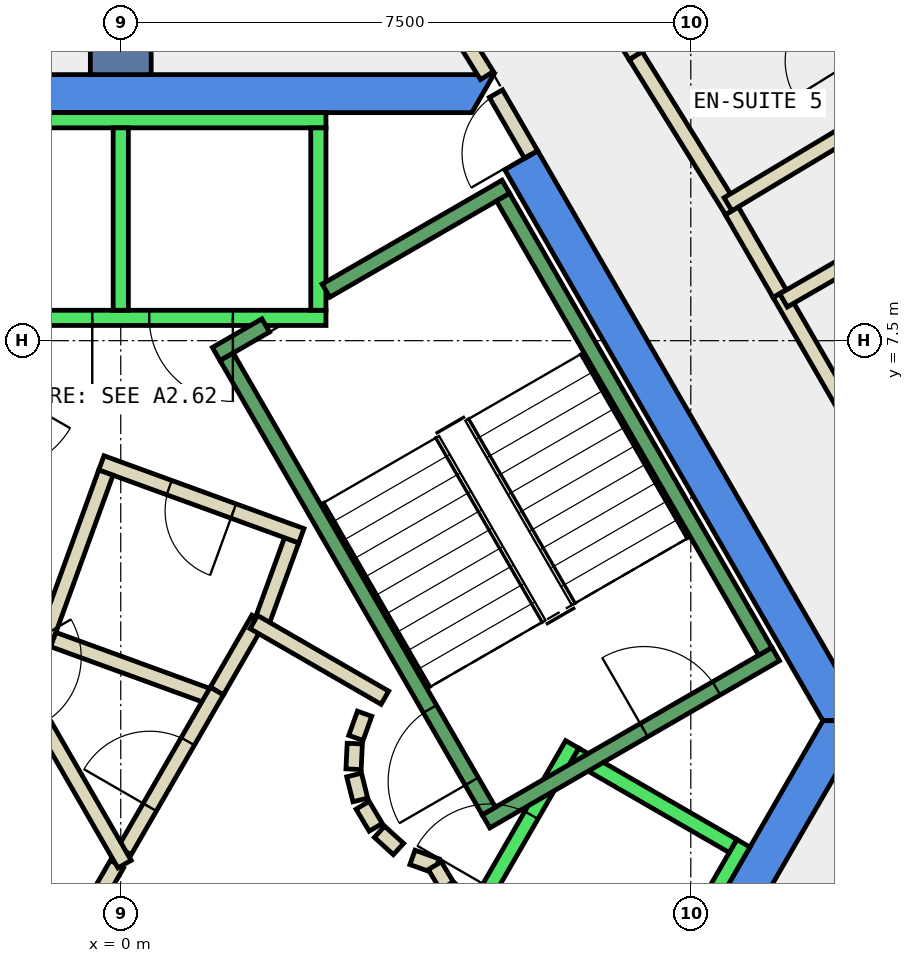
"""IFC4 building model, lengths in metres.
Left out: names, types, materials, properties, quantities, classifications, styles, units other than length and angle.
Written with IfcOpenShell. Run it as: python <this file> out.ifc"""

import sys

from ifc_helpers import new_model, si_unit, direction, frame, frame_2d, origin, place, context, subcontext, project, spatial, polyline, rectangle, outline, extrude, element, fill, save


model = new_model("IFC4")
c1 = context("Model", 3, precision=1e-05, world=origin(), true_north=direction((0.0, 1.0)))
c2 = subcontext(c1, "Body", "Model", "MODEL_VIEW")
j1 = project(units=[si_unit("LENGTHUNIT", "METRE"), si_unit("PLANEANGLEUNIT", "RADIAN")], contexts=[c1])
p1 = place(None, origin())
s1 = spatial("IfcSite", under=j1, at=p1, CompositionType="ELEMENT")
p2 = place(p1, origin())
s2 = spatial("IfcBuilding", under=s1, at=p2, CompositionType="ELEMENT")
p3 = place(p2, frame((0.0, 0.0, 293.6)))
s3 = spatial("IfcBuildingStorey", under=s2, at=p3, CompositionType="ELEMENT", Elevation=293.6)
p4 = place(p3, frame((0.0, 0.0, -0.34)))
e1 = element("IfcWall", 1, at=p4, inside=s3, PredefinedType="SHEAR", context=c2, shape_type="SweptSolid", body=[
    extrude(outline(polyline([(5.486, 9.998), (5.053, 9.748), (9.238, 2.5), (9.815, 2.5), (5.486, 9.998)])), origin(), (0.0, 0.0, 1.0), 3.6),
])
p5 = place(p3, frame((0.0, 0.0, -0.34)))
e2 = element("IfcWall", 2, at=p5, inside=s3, PredefinedType="SHEAR", context=c2, shape_type="SweptSolid", body=[
    extrude(outline(polyline([(4.907, 11.0), (-4.907, 11.0), (-4.619, 10.5), (4.619, 10.5), (4.907, 11.0)])), origin(), (0.0, 0.0, 1.0), 3.6),
])
p6 = place(p3, frame((0.0, 0.0, -0.34)))
e3 = element("IfcWall", 3, at=p6, inside=s3, PredefinedType="SHEAR", context=c2, shape_type="SweptSolid", body=[
    extrude(outline(polyline([(4.907, -6.0), (9.815, 2.5), (9.238, 2.5), (4.619, -5.5), (4.907, -6.0)])), origin(), (0.0, 0.0, 1.0), 3.6),
])
p7 = place(p3, frame((0.0, 11.0, -0.34), z_axis=(0.0, 0.0, 1.0), x_axis=(0.0, 1.0, 0.0)))
e4 = element("IfcWall", 4, at=p7, inside=s3, PredefinedType="SHEAR", context=c2, shape_type="SweptSolid", body=[
    extrude(rectangle(XDim=9.0, YDim=0.8, at=frame_2d((4.5, 0.0))), origin(), (0.0, 0.0, 1.0), 3.6),
])
p8 = place(p3, frame((1.264, 2.89, 0.0), z_axis=(0.0, 0.0, 1.0), x_axis=(0.500043792738, 0.866000118559, 0.0)))
e5 = element("IfcWall", 5, at=p8, inside=s3, PredefinedType="PARTITIONING", context=c2, shape_type="SweptSolid", body=[
    extrude(rectangle(XDim=1.096, YDim=0.2, at=frame_2d((0.548, 0.0))), origin(), (0.0, 0.0, 1.0), 3.26),
])
p9 = place(p3, frame((1.838, 3.748, 0.0), z_axis=(0.0, 0.0, 1.0), x_axis=(0.342266462435, 0.939602931398, 0.0)))
e6 = element("IfcWall", 6, at=p9, inside=s3, PredefinedType="PARTITIONING", context=c2, shape_type="SweptSolid", body=[
    extrude(rectangle(XDim=1.198, YDim=0.2, at=frame_2d((0.599, 0.0))), origin(), (0.0, 0.0, 1.0), 3.26),
])
p10 = place(p3, frame((2.376, 4.934, 0.0), z_axis=(0.0, 0.0, 1.0), x_axis=(-0.939640574808, 0.342163104635, 0.0)))
e7 = element("IfcWall", 7, at=p10, inside=s3, PredefinedType="PARTITIONING", context=c2, shape_type="SweptSolid", body=[
    extrude(rectangle(XDim=2.8, YDim=0.2, at=frame_2d((1.4, 0.0))), origin(), (0.0, 0.0, 1.0), 3.26),
])
p11 = place(p10, frame((0.95, 0.0, 0.0)))
e8 = element("IfcOpeningElement", 8, at=p11, cuts=e7, PredefinedType="OPENING", context=c2, shape_type="SweptSolid", body=[
    extrude(rectangle(XDim=0.9, YDim=2.1, at=frame_2d((0.45, 1.05))), frame((0.0, 0.11, 0.0), z_axis=(0.0, -1.0, 0.0), x_axis=(1.0, 0.0, 0.0)), (0.0, 0.0, 1.0), 0.22),
])
p12 = place(p3, frame((-0.196, 5.764, 0.0), z_axis=(0.0, 0.0, 1.0), x_axis=(-0.34165322761, -0.939826086073, 0.0)))
e9 = element("IfcWall", 9, at=p12, inside=s3, PredefinedType="PARTITIONING", context=c2, shape_type="SweptSolid", body=[
    extrude(rectangle(XDim=2.4, YDim=0.2, at=frame_2d((1.2, 0.0))), origin(), (0.0, 0.0, 1.0), 3.26),
])
p13 = place(p3, frame((-0.888, 3.568, 0.0), z_axis=(0.0, 0.0, 1.0), x_axis=(0.939685034098, -0.34204098686, 0.0)))
e10 = element("IfcWall", 10, at=p13, inside=s3, PredefinedType="PARTITIONING", context=c2, shape_type="SweptSolid", body=[
    extrude(rectangle(XDim=2.237, YDim=0.2, at=frame_2d((1.119, 0.0))), origin(), (0.0, 0.0, 1.0), 3.26),
])
p14 = place(p3, frame((2.62, 14.526, 0.0), z_axis=(0.0, 0.0, 1.0), x_axis=(0.527726136463, -0.84941457775, 0.0)))
e11 = element("IfcWall", 11, at=p14, inside=s3, PredefinedType="PARTITIONING", context=c2, shape_type="SweptSolid", body=[
    extrude(rectangle(XDim=4.165, YDim=0.2, at=frame_2d((2.083, 0.0))), origin(), (0.0, 0.0, 1.0), 2.4),
])
p15 = place(p14, frame((1.583, 0.0, 0.0)))
e12 = element("IfcOpeningElement", 12, at=p15, cuts=e11, PredefinedType="OPENING", context=c2, shape_type="SweptSolid", body=[
    extrude(rectangle(XDim=1.0, YDim=2.1, at=frame_2d((0.5, 1.05))), frame((0.0, 0.11, 0.0), z_axis=(0.0, -1.0, 0.0), x_axis=(1.0, 0.0, 0.0)), (0.0, 0.0, 1.0), 0.22),
])
p16 = place(p3, frame((8.039, 9.209, 0.0), z_axis=(0.0, 0.0, 1.0), x_axis=(0.500219543227, -0.865898613334, 0.0)))
e13 = element("IfcWall", 13, at=p16, inside=s3, PredefinedType="PARTITIONING", context=c2, shape_type="SweptSolid", body=[
    extrude(rectangle(XDim=1.261, YDim=0.2, at=frame_2d((0.631, 0.0))), origin(), (0.0, 0.0, 1.0), 3.26),
])
p17 = place(p3, frame((8.67, 8.117, 0.0), z_axis=(0.0, 0.0, 1.0), x_axis=(0.50002537861, -0.866010750942, 0.0)))
e14 = element("IfcWall", 14, at=p17, inside=s3, PredefinedType="PARTITIONING", context=c2, shape_type="SweptSolid", body=[
    extrude(rectangle(XDim=3.0, YDim=0.2, at=frame_2d((1.5, 0.0))), origin(), (0.0, 0.0, 1.0), 3.26),
])
p18 = place(p3, frame((4.022, 15.68, 0.0), z_axis=(0.0, 0.0, 1.0), x_axis=(0.527737948498, -0.849407239029, 0.0)))
e15 = element("IfcWall", 15, at=p18, inside=s3, PredefinedType="PARTITIONING", context=c2, shape_type="SweptSolid", body=[
    extrude(rectangle(XDim=5.217, YDim=0.2, at=frame_2d((2.608, 0.0))), origin(), (0.0, 0.0, 1.0), 3.26),
])
p19 = place(p18, frame((2.159, 0.0, 0.0)))
e16 = element("IfcOpeningElement", 16, at=p19, cuts=e15, PredefinedType="OPENING", context=c2, shape_type="SweptSolid", body=[
    extrude(rectangle(XDim=1.0, YDim=2.1, at=frame_2d((0.5, 1.05))), frame((0.0, 0.11, 0.0), z_axis=(0.0, -1.0, 0.0), x_axis=(1.0, 0.0, 0.0)), (0.0, 0.0, 1.0), 0.22),
])
p20 = place(p3, frame((6.775, 11.249, 0.0), z_axis=(0.0, 0.0, 1.0), x_axis=(0.527803270752, -0.849366650736, 0.0)))
e17 = element("IfcWall", 17, at=p20, inside=s3, PredefinedType="PARTITIONING", context=c2, shape_type="SweptSolid", body=[
    extrude(rectangle(XDim=2.401, YDim=0.2, at=frame_2d((1.2, 0.0))), origin(), (0.0, 0.0, 1.0), 3.26),
])
p21 = place(p3, frame((-0.982, -1.0, 0.0), z_axis=(0.0, 0.0, 1.0), x_axis=(0.50024047865, 0.865886518847, 0.0)))
e18 = element("IfcWall", 18, at=p21, inside=s3, PredefinedType="PARTITIONING", context=c2, shape_type="SweptSolid", body=[
    extrude(rectangle(XDim=1.863, YDim=0.2, at=frame_2d((0.931, 0.0))), origin(), (0.0, 0.0, 1.0), 3.26),
])
p22 = place(p3, frame((0.05, 0.787, 0.0), z_axis=(0.0, 0.0, 1.0), x_axis=(0.499945861543, 0.866056658381, 0.0)))
e19 = element("IfcWall", 19, at=p22, inside=s3, PredefinedType="PARTITIONING", context=c2, shape_type="SweptSolid", body=[
    extrude(rectangle(XDim=2.428, YDim=0.2, at=frame_2d((1.214, 0.0))), origin(), (0.0, 0.0, 1.0), 3.26),
])
p23 = place(p22, frame((0.664, 0.0, 0.0)))
e20 = element("IfcOpeningElement", 20, at=p23, cuts=e19, PredefinedType="OPENING", context=c2, shape_type="SweptSolid", body=[
    extrude(rectangle(XDim=1.0, YDim=2.1, at=frame_2d((0.5, 1.05))), frame((0.0, 0.11, 0.0), z_axis=(0.0, -1.0, 0.0), x_axis=(1.0, 0.0, 0.0)), (0.0, 0.0, 1.0), 0.22),
])
p24 = place(p3, frame((1.751, 3.798, 0.0), z_axis=(0.0, 0.0, 1.0), x_axis=(0.866091650241, -0.499885240213, 0.0)))
e21 = element("IfcWall", 21, at=p24, inside=s3, PredefinedType="PARTITIONING", context=c2, shape_type="SweptSolid", body=[
    extrude(rectangle(XDim=1.991, YDim=0.2, at=frame_2d((0.995, 0.0))), origin(), (0.0, 0.0, 1.0), 3.26),
])
p25 = place(p3, frame((3.208, 2.592, 0.0), z_axis=(0.0, 0.0, 1.0), x_axis=(-0.337388820924, -0.941365382578, 0.0)))
e22 = element("IfcWall", 22, at=p25, inside=s3, PredefinedType="PARTITIONING", context=c2, shape_type="SweptSolid", body=[
    extrude(rectangle(XDim=0.338, YDim=0.2, at=frame_2d((0.169, 0.0))), origin(), (0.0, 0.0, 1.0), 3.26),
])
p26 = place(p3, frame((3.079, 2.199, 0.0), z_axis=(0.0, 0.0, 1.0), x_axis=(-0.047771483479, -0.998858290933, 0.0)))
e23 = element("IfcWall", 23, at=p26, inside=s3, PredefinedType="PARTITIONING", context=c2, shape_type="SweptSolid", body=[
    extrude(rectangle(XDim=0.337, YDim=0.2, at=frame_2d((0.169, 0.0))), origin(), (0.0, 0.0, 1.0), 3.26),
])
p27 = place(p3, frame((3.07, 1.786, 0.0), z_axis=(0.0, 0.0, 1.0), x_axis=(0.242705583207, -0.970099994784, 0.0)))
e24 = element("IfcWall", 24, at=p27, inside=s3, PredefinedType="PARTITIONING", context=c2, shape_type="SweptSolid", body=[
    extrude(rectangle(XDim=0.338, YDim=0.2, at=frame_2d((0.169, 0.0))), origin(), (0.0, 0.0, 1.0), 3.26),
])
for number, where, z_axis, x_axis in (
    (25, (3.182, 1.388, 0.0), (0.0, 0.0, 1.0), (0.512, -0.859, 0.0)),
    (26, (3.404, 1.039, 0.0), (0.0, 0.0, 1.0), (0.74, -0.672, 0.0)),
):
    element("IfcWall", number, at=place(p3, frame(where, z_axis=z_axis, x_axis=x_axis)), inside=s3, PredefinedType="PARTITIONING", context=c2, shape_type="SweptSolid", body=[
        extrude(rectangle(XDim=0.338, YDim=0.2, at=frame_2d((0.169, 0.0))), origin(), (0.0, 0.0, 1.0), 3.26),
    ])
p28 = place(p3, frame((3.838, 0.702, 0.0), z_axis=(0.0, 0.0, 1.0), x_axis=(0.941035081519, -0.338308993895, 0.0)))
e27 = element("IfcWall", 27, at=p28, inside=s3, PredefinedType="PARTITIONING", context=c2, shape_type="SweptSolid", body=[
    extrude(rectangle(XDim=0.337, YDim=0.2, at=frame_2d((0.168, 0.0))), origin(), (0.0, 0.0, 1.0), 3.26),
])
p29 = place(p3, frame((4.132, 0.593, 0.0), z_axis=(0.0, 0.0, 1.0), x_axis=(0.513561617048, -0.858052717201, 0.0)))
e28 = element("IfcWall", 28, at=p29, inside=s3, PredefinedType="PARTITIONING", context=c2, shape_type="SweptSolid", body=[
    extrude(rectangle(XDim=0.308, YDim=0.2, at=frame_2d((0.154, 0.0))), origin(), (0.0, 0.0, 1.0), 3.26),
])
p30 = place(p3, frame((4.301, 0.315, 0.0), z_axis=(0.0, 0.0, 1.0), x_axis=(0.741798017506, -0.670623367639, 0.0)))
e29 = element("IfcWall", 29, at=p30, inside=s3, PredefinedType="PARTITIONING", context=c2, shape_type="SweptSolid", body=[
    extrude(rectangle(XDim=0.309, YDim=0.2, at=frame_2d((0.154, 0.0))), origin(), (0.0, 0.0, 1.0), 3.26),
])
p31 = place(p3, frame((-2.54, 5.1, 0.0), z_axis=(0.0, 0.0, 1.0), x_axis=(0.499925051871, -0.866068670783, 0.0)))
e30 = element("IfcWall", 30, at=p31, inside=s3, PredefinedType="PARTITIONING", context=c2, shape_type="SweptSolid", body=[
    extrude(rectangle(XDim=5.181, YDim=0.2, at=frame_2d((2.59, 0.0))), origin(), (0.0, 0.0, 1.0), 3.26),
])
p32 = place(p31, frame((2.04, 0.0, 0.0)))
e31 = element("IfcOpeningElement", 31, at=p32, cuts=e30, PredefinedType="OPENING", context=c2, shape_type="SweptSolid", body=[
    extrude(rectangle(XDim=1.0, YDim=2.1, at=frame_2d((0.5, 1.05))), frame((0.0, 0.11, 0.0), z_axis=(0.0, -1.0, 0.0), x_axis=(1.0, 0.0, 0.0)), (0.0, 0.0, 1.0), 0.22),
])
p33 = place(p3, frame((10.885, 9.28, 0.0), z_axis=(0.0, 0.0, 1.0), x_axis=(-0.866022959057, -0.500004234368, 0.0)))
e32 = element("IfcWall", 32, at=p33, inside=s3, PredefinedType="PARTITIONING", context=c2, shape_type="SweptSolid", body=[
    extrude(rectangle(XDim=2.5, YDim=0.2, at=frame_2d((1.25, 0.0))), origin(), (0.0, 0.0, 1.0), 3.26),
])
p34 = place(p3, frame((7.989, 9.295, 0.0), z_axis=(0.0, 0.0, 1.0), x_axis=(0.857801856135, 0.513980520654, 0.0)))
e33 = element("IfcWall", 33, at=p34, inside=s3, PredefinedType="PARTITIONING", context=c2, shape_type="SweptSolid", body=[
    extrude(rectangle(XDim=2.3, YDim=0.2, at=frame_2d((1.15, 0.0))), origin(), (0.0, 0.0, 1.0), 3.26),
])
p35 = place(p3, frame((10.1, 10.443, 0.0), z_axis=(0.0, 0.0, 1.0), x_axis=(-0.527510239672, 0.849548672555, 0.0)))
e34 = element("IfcWall", 34, at=p35, inside=s3, PredefinedType="PARTITIONING", context=c2, shape_type="SweptSolid", body=[
    extrude(rectangle(XDim=2.639, YDim=0.2, at=frame_2d((1.319, 0.0))), origin(), (0.0, 0.0, 1.0), 3.26),
])
p36 = place(p35, frame((0.869, 0.0, 0.0)))
e35 = element("IfcOpeningElement", 35, at=p36, cuts=e34, PredefinedType="OPENING", context=c2, shape_type="SweptSolid", body=[
    extrude(rectangle(XDim=0.9, YDim=2.1, at=frame_2d((0.45, 1.05))), frame((0.0, 0.11, 0.0), z_axis=(0.0, -1.0, 0.0), x_axis=(1.0, 0.0, 0.0)), (0.0, 0.0, 1.0), 0.22),
])
p37 = place(p3, frame((5.399, 9.948, 0.0), z_axis=(0.0, 0.0, 1.0), x_axis=(-0.499882215713, 0.866093395895, 0.0)))
e36 = element("IfcWall", 36, at=p37, inside=s3, PredefinedType="PARTITIONING", context=c2, shape_type="SweptSolid", body=[
    extrude(rectangle(XDim=0.926, YDim=0.2, at=frame_2d((0.463, 0.0))), origin(), (0.0, 0.0, 1.0), 2.4),
])
p38 = place(p37, frame((0.017, 0.0, 0.0)))
e37 = element("IfcOpeningElement", 37, at=p38, cuts=e36, PredefinedType="OPENING", context=c2, shape_type="SweptSolid", body=[
    extrude(rectangle(XDim=0.9, YDim=2.1, at=frame_2d((0.45, 1.05))), frame((0.0, 0.11, 0.0), z_axis=(0.0, -1.0, 0.0), x_axis=(1.0, 0.0, 0.0)), (0.0, 0.0, 1.0), 0.22),
])
p39 = place(p3, frame((2.7, 7.8, 0.0), z_axis=(0.0, 0.0, 1.0), x_axis=(-1.0, 0.0, 0.0)))
e38 = element("IfcWall", 38, at=p39, inside=s3, PredefinedType="STANDARD", context=c2, shape_type="SweptSolid", body=[
    extrude(rectangle(XDim=5.4, YDim=0.2, at=frame_2d((2.7, 0.0))), origin(), (0.0, 0.0, 1.0), 3.26),
])
p40 = place(p39, frame((1.225, 0.0, 0.0)))
e39 = element("IfcOpeningElement", 39, at=p40, cuts=e38, PredefinedType="OPENING", context=c2, shape_type="SweptSolid", body=[
    extrude(rectangle(XDim=1.1, YDim=2.1, at=frame_2d((0.55, 1.05))), frame((0.0, 0.11, 0.0), z_axis=(0.0, -1.0, 0.0), x_axis=(1.0, 0.0, 0.0)), (0.0, 0.0, 1.0), 0.22),
])
p41 = place(p39, frame((3.075, 0.0, 0.0)))
e40 = element("IfcOpeningElement", 40, at=p41, cuts=e38, PredefinedType="OPENING", context=c2, shape_type="SweptSolid", body=[
    extrude(rectangle(XDim=1.1, YDim=2.1, at=frame_2d((0.55, 1.05))), frame((0.0, 0.11, 0.0), z_axis=(0.0, -1.0, 0.0), x_axis=(1.0, 0.0, 0.0)), (0.0, 0.0, 1.0), 0.22),
])
p42 = place(p3, frame((2.7, 10.4, 0.0), z_axis=(0.0, 0.0, 1.0), x_axis=(-1.0, 0.0, 0.0)))
e41 = element("IfcWall", 41, at=p42, inside=s3, PredefinedType="STANDARD", context=c2, shape_type="SweptSolid", body=[
    extrude(rectangle(XDim=5.4, YDim=0.2, at=frame_2d((2.7, 0.0))), origin(), (0.0, 0.0, 1.0), 3.26),
])
for number, where, z_axis, x_axis in (
    (42, (2.6, 7.9, 0.0), (0.0, 0.0, 1.0), (0.0, 1.0, 0.0)),
    (43, (0.0, 7.9, 0.0), (0.0, 0.0, 1.0), (0.0, 1.0, 0.0)),
):
    element("IfcWall", number, at=place(p3, frame(where, z_axis=z_axis, x_axis=x_axis)), inside=s3, PredefinedType="STANDARD", context=c2, shape_type="SweptSolid", body=[
        extrude(rectangle(XDim=2.4, YDim=0.2, at=frame_2d((1.2, 0.0))), origin(), (0.0, 0.0, 1.0), 3.26),
    ])
p43 = place(p3, frame((3.24, -2.488, 0.0), z_axis=(0.0, 0.0, 1.0), x_axis=(0.500034260056, 0.866005622828, 0.0)))
e44 = element("IfcWall", 44, at=p43, inside=s3, PredefinedType="STANDARD", context=c2, shape_type="SweptSolid", body=[
    extrude(rectangle(XDim=5.399, YDim=0.2, at=frame_2d((2.7, 0.0))), origin(), (0.0, 0.0, 1.0), 3.26),
])
p44 = place(p43, frame((3.225, 0.0, 0.0)))
e45 = element("IfcOpeningElement", 45, at=p44, cuts=e44, PredefinedType="OPENING", context=c2, shape_type="SweptSolid", body=[
    extrude(rectangle(XDim=1.1, YDim=2.1, at=frame_2d((0.55, 1.05))), frame((0.0, 0.11, 0.0), z_axis=(0.0, -1.0, 0.0), x_axis=(1.0, 0.0, 0.0)), (0.0, 0.0, 1.0), 0.22),
])
p45 = place(p43, frame((1.225, 0.0, 0.0)))
e46 = element("IfcOpeningElement", 46, at=p45, cuts=e44, PredefinedType="OPENING", context=c2, shape_type="SweptSolid", body=[
    extrude(rectangle(XDim=1.1, YDim=2.1, at=frame_2d((0.55, 1.05))), frame((0.0, 0.11, 0.0), z_axis=(0.0, -1.0, 0.0), x_axis=(1.0, 0.0, 0.0)), (0.0, 0.0, 1.0), 0.22),
])
p46 = place(p3, frame((5.492, -3.788, 0.0), z_axis=(0.0, 0.0, 1.0), x_axis=(0.500034260056, 0.866005622828, 0.0)))
e47 = element("IfcWall", 47, at=p46, inside=s3, PredefinedType="STANDARD", context=c2, shape_type="SweptSolid", body=[
    extrude(rectangle(XDim=5.399, YDim=0.2, at=frame_2d((2.7, 0.0))), origin(), (0.0, 0.0, 1.0), 3.26),
])
p47 = place(p3, frame((5.977, 2.052, 0.0), z_axis=(0.0, 0.0, 1.0), x_axis=(0.865973769406, -0.500089422704, 0.0)))
e48 = element("IfcWall", 48, at=p47, inside=s3, PredefinedType="STANDARD", context=c2, shape_type="SweptSolid", body=[
    extrude(rectangle(XDim=2.399, YDim=0.2, at=frame_2d((1.2, 0.0))), origin(), (0.0, 0.0, 1.0), 3.26),
])
p48 = place(p3, frame((4.806, 1.176, 0.0), z_axis=(0.0, 0.0, 1.0), x_axis=(0.866059941101, 0.499940174841, 0.0)))
e49 = element("IfcWall", 49, at=p48, inside=s3, PredefinedType="STANDARD", context=c2, shape_type="SweptSolid", body=[
    extrude(rectangle(XDim=4.4, YDim=0.2, at=frame_2d((2.2, 0.0))), origin(), (0.0, 0.0, 1.0), 3.26),
])
p49 = place(p48, frame((2.4, 0.0, 0.0)))
e50 = element("IfcOpeningElement", 50, at=p49, cuts=e49, PredefinedType="OPENING", context=c2, shape_type="SweptSolid", body=[
    extrude(rectangle(XDim=1.1, YDim=2.2, at=frame_2d((0.55, 1.1))), frame((0.0, 0.11, 0.0), z_axis=(0.0, -1.0, 0.0), x_axis=(1.0, 0.0, 0.0)), (0.0, 0.0, 1.0), 0.22),
])
p50 = place(p3, frame((2.7, 8.158, 0.0), z_axis=(0.0, 0.0, 1.0), x_axis=(0.86611865017, 0.499838457731, 0.0)))
e51 = element("IfcWall", 51, at=p50, inside=s3, PredefinedType="STANDARD", context=c2, shape_type="SweptSolid", body=[
    extrude(rectangle(XDim=2.733, YDim=0.2, at=frame_2d((1.366, 0.0))), origin(), (0.0, 0.0, 1.0), 3.26),
])
p51 = place(p3, frame((1.256, 7.324, 0.0), z_axis=(0.0, 0.0, 1.0), x_axis=(0.865915093549, 0.500191014278, 0.0)))
e52 = element("IfcWall", 52, at=p51, inside=s3, PredefinedType="STANDARD", context=c2, shape_type="SweptSolid", body=[
    extrude(rectangle(XDim=0.752, YDim=0.2, at=frame_2d((0.376, 0.0))), origin(), (0.0, 0.0, 1.0), 3.26),
])
p52 = place(p3, frame((4.843, 1.312, 0.0), z_axis=(0.0, 0.0, 1.0), x_axis=(-0.499963383562, 0.866046543262, 0.0)))
e53 = element("IfcWall", 53, at=p52, inside=s3, PredefinedType="STANDARD", context=c2, shape_type="SweptSolid", body=[
    extrude(rectangle(XDim=6.9, YDim=0.2, at=frame_2d((3.45, 0.0))), origin(), (0.0, 0.0, 1.0), 3.26),
])
p53 = place(p52, frame((0.45, 0.0, 0.0)))
e54 = element("IfcOpeningElement", 54, at=p53, cuts=e53, PredefinedType="OPENING", context=c2, shape_type="SweptSolid", body=[
    extrude(rectangle(XDim=1.1, YDim=2.2, at=frame_2d((0.55, 1.1))), frame((0.0, 0.11, 0.0), z_axis=(0.0, -1.0, 0.0), x_axis=(1.0, 0.0, 0.0)), (0.0, 0.0, 1.0), 0.22),
])
p54 = place(p3, frame((8.48, 3.412, 0.0), z_axis=(0.0, 0.0, 1.0), x_axis=(-0.499978703459, 0.866037698999, 0.0)))
e55 = element("IfcWall", 55, at=p54, inside=s3, PredefinedType="STANDARD", context=c2, shape_type="SweptSolid", body=[
    extrude(rectangle(XDim=6.9, YDim=0.2, at=frame_2d((3.45, 0.0))), origin(), (0.0, 0.0, 1.0), 3.26),
])
p55 = place(p36, origin())
e56 = element("IfcDoor", 56, at=p55, inside=s3, OperationType="SINGLE_SWING_LEFT", PredefinedType="DOOR", context=c2, shape_type="SweptSolid", body=[
    extrude(rectangle(XDim=0.9, YDim=2.1, at=frame_2d((0.45, 1.05))), frame((0.0, 0.025, 0.0), z_axis=(0.0, -1.0, 0.0), x_axis=(1.0, 0.0, 0.0)), (0.0, 0.0, 1.0), 0.05),
])
fill(e35, e56)
p56 = place(p23, origin())
e57 = element("IfcDoor", 57, at=p56, inside=s3, OperationType="SINGLE_SWING_RIGHT", PredefinedType="DOOR", context=c2, shape_type="SweptSolid", body=[
    extrude(rectangle(XDim=1.0, YDim=2.1, at=frame_2d((0.5, 1.05))), frame((0.0, 0.025, 0.0), z_axis=(0.0, -1.0, 0.0), x_axis=(1.0, 0.0, 0.0)), (0.0, 0.0, 1.0), 0.05),
])
fill(e20, e57)
p57 = place(p11, origin())
e58 = element("IfcDoor", 58, at=p57, inside=s3, OperationType="SINGLE_SWING_LEFT", PredefinedType="DOOR", context=c2, shape_type="SweptSolid", body=[
    extrude(rectangle(XDim=0.9, YDim=2.1, at=frame_2d((0.45, 1.05))), frame((0.0, 0.025, 0.0), z_axis=(0.0, -1.0, 0.0), x_axis=(1.0, 0.0, 0.0)), (0.0, 0.0, 1.0), 0.05),
])
fill(e8, e58)
p58 = place(p38, origin())
e59 = element("IfcDoor", 59, at=p58, inside=s3, OperationType="SINGLE_SWING_LEFT", PredefinedType="DOOR", context=c2, shape_type="SweptSolid", body=[
    extrude(rectangle(XDim=0.9, YDim=2.1, at=frame_2d((0.45, 1.05))), frame((0.0, 0.025, 0.0), z_axis=(0.0, -1.0, 0.0), x_axis=(1.0, 0.0, 0.0)), (0.0, 0.0, 1.0), 0.05),
])
fill(e37, e59)
p59 = place(p40, origin())
e60 = element("IfcDoor", 60, at=p59, inside=s3, OperationType="SLIDING_TO_LEFT", PredefinedType="DOOR", context=c2, shape_type="SweptSolid", body=[
    extrude(rectangle(XDim=1.1, YDim=2.1, at=frame_2d((0.55, 1.05))), frame((0.0, 0.025, 0.0), z_axis=(0.0, -1.0, 0.0), x_axis=(1.0, 0.0, 0.0)), (0.0, 0.0, 1.0), 0.05),
])
fill(e39, e60)
p60 = place(p41, origin())
e61 = element("IfcDoor", 61, at=p60, inside=s3, OperationType="SLIDING_TO_LEFT", PredefinedType="DOOR", context=c2, shape_type="SweptSolid", body=[
    extrude(rectangle(XDim=1.1, YDim=2.1, at=frame_2d((0.55, 1.05))), frame((0.0, 0.025, 0.0), z_axis=(0.0, -1.0, 0.0), x_axis=(1.0, 0.0, 0.0)), (0.0, 0.0, 1.0), 0.05),
])
fill(e40, e61)
p61 = place(p44, origin())
e62 = element("IfcDoor", 62, at=p61, inside=s3, OperationType="SLIDING_TO_LEFT", PredefinedType="DOOR", context=c2, shape_type="SweptSolid", body=[
    extrude(rectangle(XDim=1.1, YDim=2.1, at=frame_2d((0.55, 1.05))), frame((0.0, 0.025, 0.0), z_axis=(0.0, -1.0, 0.0), x_axis=(1.0, 0.0, 0.0)), (0.0, 0.0, 1.0), 0.05),
])
fill(e45, e62)
p62 = place(p53, origin())
e63 = element("IfcDoor", 63, at=p62, inside=s3, OperationType="SINGLE_SWING_LEFT", PredefinedType="DOOR", context=c2, shape_type="SweptSolid", body=[
    extrude(rectangle(XDim=1.1, YDim=2.2, at=frame_2d((0.55, 1.1))), frame((0.0, 0.025, 0.0), z_axis=(0.0, -1.0, 0.0), x_axis=(1.0, 0.0, 0.0)), (0.0, 0.0, 1.0), 0.05),
])
fill(e54, e63)
p63 = place(p49, origin())
e64 = element("IfcDoor", 64, at=p63, inside=s3, OperationType="SINGLE_SWING_LEFT", PredefinedType="DOOR", context=c2, shape_type="SweptSolid", body=[
    extrude(rectangle(XDim=1.1, YDim=2.2, at=frame_2d((0.55, 1.1))), frame((0.0, 0.025, 0.0), z_axis=(0.0, -1.0, 0.0), x_axis=(1.0, 0.0, 0.0)), (0.0, 0.0, 1.0), 0.05),
])
fill(e50, e64)
save(model, sys.argv[1])
